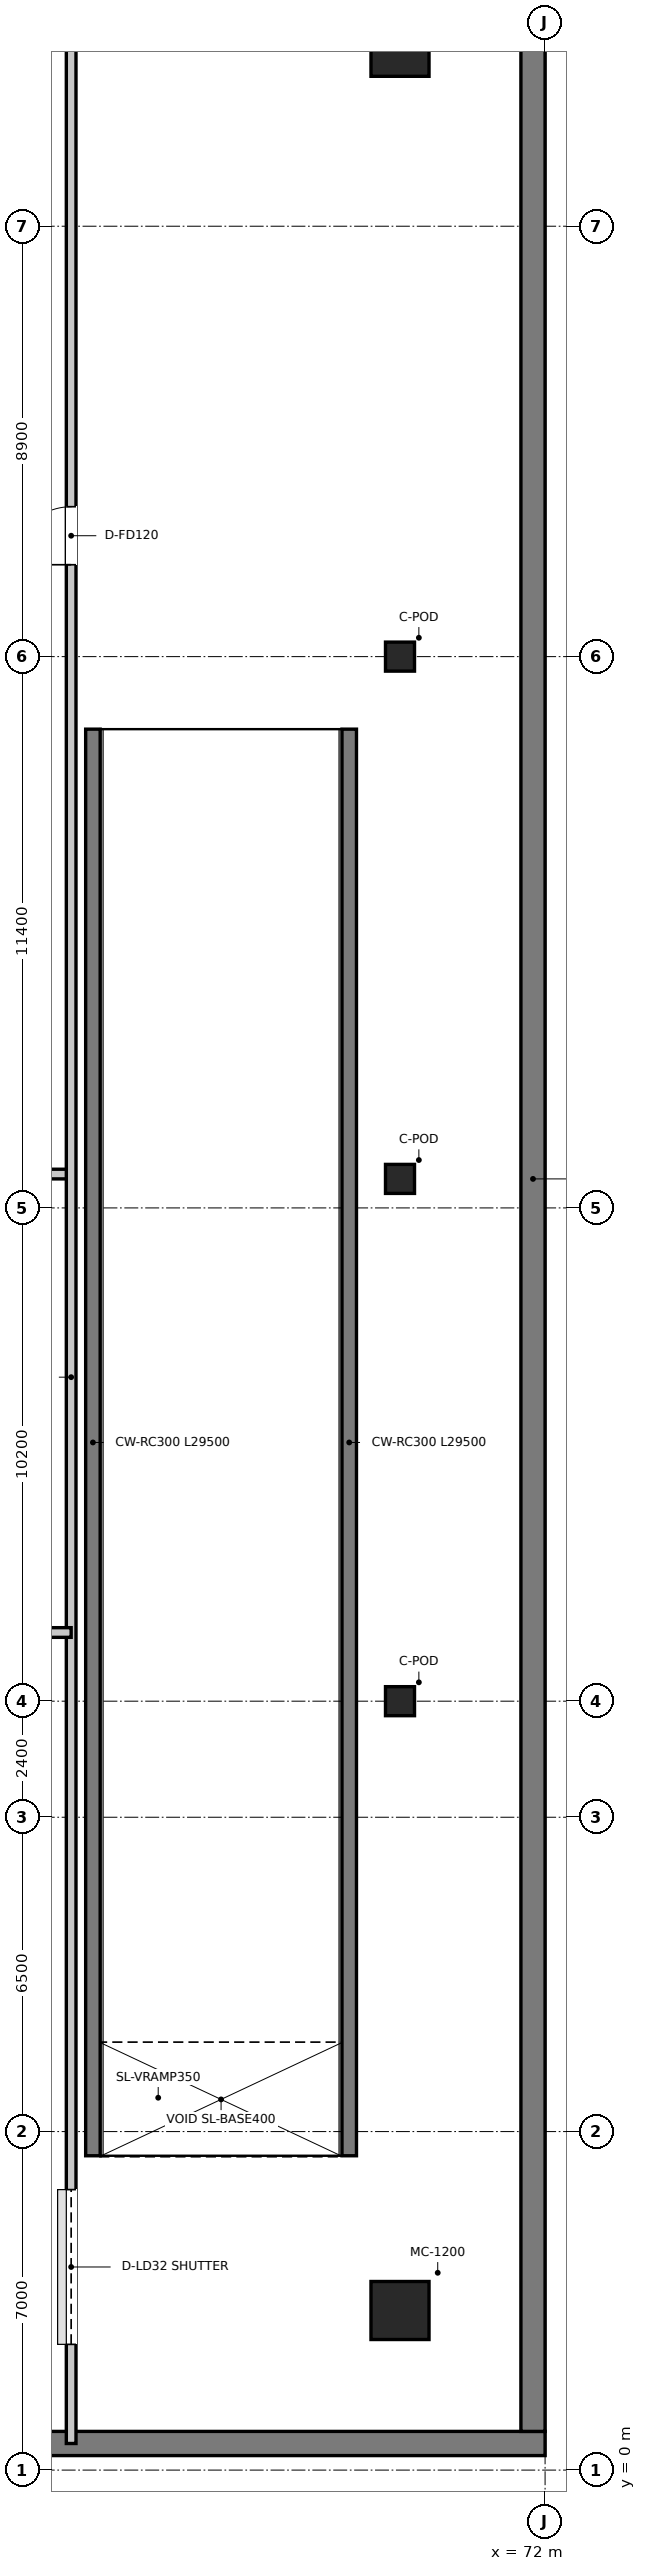
"""IFC4 building model, lengths in metres.
Left out: names, types, materials, properties, quantities, classifications, styles, units other than length and angle.
Written with IfcOpenShell. Run it as: python <this file> out.ifc"""

import sys

from ifc_helpers import new_model, si_unit, direction, frame, frame_2d, origin, origin_2d, place, context, subcontext, project, spatial, rectangle, extrude, source, transform, mapped, element, fill, save


model = new_model("IFC4")
c1 = context("Model", 3, precision=1e-05, world=origin(), true_north=direction((0.0, 1.0)))
c2 = subcontext(c1, "Body", "Model", "MODEL_VIEW")
j1 = project(units=[si_unit("LENGTHUNIT", "METRE"), si_unit("PLANEANGLEUNIT", "RADIAN")], contexts=[c1])
p1 = place(None, origin())
s1 = spatial("IfcSite", under=j1, at=p1, CompositionType="ELEMENT")
p2 = place(p1, origin())
s2 = spatial("IfcBuilding", under=s1, at=p2, CompositionType="ELEMENT")
p3 = place(p2, frame((0.0, 0.0, -4.8)))
s3 = spatial("IfcBuildingStorey", under=s2, at=p3, CompositionType="ELEMENT", Elevation=-4.8)
p4 = place(p3, frame((0.0, 0.55, 0.0), z_axis=(0.0, 0.0, 1.0), x_axis=(1.0, 0.0, 0.0)))
e1 = element("IfcWall", 1, at=p4, inside=s3, PredefinedType="SOLIDWALL", context=c2, shape_type="SweptSolid", body=[
    extrude(rectangle(XDim=72.0, YDim=0.5, at=frame_2d((36.0, 0.0))), origin(), (0.0, 0.0, 1.0), 4.8),
])
p5 = place(p3, frame((71.75, 0.8, 0.0), z_axis=(0.0, 0.0, 1.0), x_axis=(0.0, 1.0, 0.0)))
e2 = element("IfcWall", 2, at=p5, inside=s3, PredefinedType="SOLIDWALL", context=c2, shape_type="SweptSolid", body=[
    extrude(rectangle(XDim=51.8, YDim=0.5, at=frame_2d((25.9, 0.0))), origin(), (0.0, 0.0, 1.0), 4.8),
])
for number, where, z_axis, x_axis in (
    (3, (62.65, 6.5, 0.0), (0.0, 0.0, 1.0), (0.0, 1.0, 0.0)),
    (4, (67.95, 6.5, 0.0), (0.0, 0.0, 1.0), (0.0, 1.0, 0.0)),
):
    element("IfcWall", number, at=place(p3, frame(where, z_axis=z_axis, x_axis=x_axis)), inside=s3, PredefinedType="SHEAR", context=c2, shape_type="SweptSolid", body=[
        extrude(rectangle(XDim=29.5, YDim=0.3, at=frame_2d((14.75, 0.0))), origin(), (0.0, 0.0, 1.0), 4.45),
    ])
m1 = source(origin(), c2, "Body", "SweptSolid", [
    extrude(rectangle(XDim=1.2, YDim=1.2, at=origin_2d()), origin(), (0.0, 0.0, 1.0), 4.8),
])
for number, where, z_axis, x_axis in (
    (5, (69.0, 3.3, 0.0), (0.0, 0.0, 1.0), (1.0, 0.0, 0.0)),
    (6, (69.0, 50.1, 0.0), (0.0, 0.0, 1.0), (1.0, 0.0, 0.0)),
):
    element("IfcColumn", number, at=place(p3, frame(where, z_axis=z_axis, x_axis=x_axis)), inside=s3, PredefinedType="USERDEFINED", context=c2, shape_type="MappedRepresentation", body=[
        mapped(m1, transform((0.0, 0.0, 0.0), x_axis=(1.0, 0.0, 0.0), y_axis=(0.0, 1.0, 0.0), z_axis=(0.0, 0.0, 1.0), scale=1.0)),
    ])
m2 = source(origin(), c2, "Body", "SweptSolid", [
    extrude(rectangle(XDim=0.6, YDim=0.6, at=origin_2d()), origin(), (0.0, 0.0, 1.0), 4.8),
])
for number, where, z_axis, x_axis in (
    (7, (69.0, 15.9, 0.0), (0.0, 0.0, 1.0), (1.0, 0.0, 0.0)),
    (8, (69.0, 26.7, 0.0), (0.0, 0.0, 1.0), (1.0, 0.0, 0.0)),
    (9, (69.0, 37.5, 0.0), (0.0, 0.0, 1.0), (1.0, 0.0, 0.0)),
):
    element("IfcColumn", number, at=place(p3, frame(where, z_axis=z_axis, x_axis=x_axis)), inside=s3, PredefinedType="COLUMN", context=c2, shape_type="MappedRepresentation", body=[
        mapped(m2, transform((0.0, 0.0, 0.0), x_axis=(1.0, 0.0, 0.0), y_axis=(0.0, 1.0, 0.0), z_axis=(0.0, 0.0, 1.0), scale=1.0)),
    ])
p6 = place(p3, frame((44.1, 26.8, 0.0), z_axis=(0.0, 0.0, 1.0), x_axis=(1.0, 0.0, 0.0)))
e10 = element("IfcWall", 10, at=p6, inside=s3, PredefinedType="PARTITIONING", context=c2, shape_type="SweptSolid", body=[
    extrude(rectangle(XDim=18.1, YDim=0.2, at=frame_2d((9.05, 0.0))), origin(), (0.0, 0.0, 1.0), 3.65),
])
p7 = place(p6, frame((4.3, 0.0, 0.0)))
e11 = element("IfcOpeningElement", 11, at=p7, cuts=e10, PredefinedType="OPENING", context=c2, shape_type="SweptSolid", body=[
    extrude(rectangle(XDim=1.2, YDim=2.15, at=frame_2d((0.6, 1.075))), frame((0.0, 0.11, 0.0), z_axis=(0.0, -1.0, 0.0), x_axis=(1.0, 0.0, 0.0)), (0.0, 0.0, 1.0), 0.22),
])
p8 = place(p6, frame((13.55, 0.0, 0.0)))
e12 = element("IfcOpeningElement", 12, at=p8, cuts=e10, PredefinedType="OPENING", context=c2, shape_type="SweptSolid", body=[
    extrude(rectangle(XDim=1.1, YDim=2.15, at=frame_2d((0.55, 1.075))), frame((0.0, 0.11, 0.0), z_axis=(0.0, -1.0, 0.0), x_axis=(1.0, 0.0, 0.0)), (0.0, 0.0, 1.0), 0.22),
])
p9 = place(p3, frame((62.2, 0.55, 0.0), z_axis=(0.0, 0.0, 1.0), x_axis=(0.0, 1.0, 0.0)))
e13 = element("IfcWall", 13, at=p9, inside=s3, PredefinedType="PARTITIONING", context=c2, shape_type="SweptSolid", body=[
    extrude(rectangle(XDim=51.95, YDim=0.2, at=frame_2d((25.975, 0.0))), origin(), (0.0, 0.0, 1.0), 3.81),
])
p10 = place(p9, frame((2.05, 0.0, 0.0)))
e14 = element("IfcOpeningElement", 14, at=p10, cuts=e13, PredefinedType="OPENING", context=c2, shape_type="SweptSolid", body=[
    extrude(rectangle(XDim=3.2, YDim=3.6, at=frame_2d((1.6, 1.8))), frame((0.0, 0.11, 0.0), z_axis=(0.0, -1.0, 0.0), x_axis=(1.0, 0.0, 0.0)), (0.0, 0.0, 1.0), 0.22),
])
p11 = place(p9, frame((38.85, 0.0, 0.0)))
e15 = element("IfcOpeningElement", 15, at=p11, cuts=e13, PredefinedType="OPENING", context=c2, shape_type="SweptSolid", body=[
    extrude(rectangle(XDim=1.2, YDim=2.15, at=frame_2d((0.6, 1.075))), frame((0.0, 0.11, 0.0), z_axis=(0.0, -1.0, 0.0), x_axis=(1.0, 0.0, 0.0)), (0.0, 0.0, 1.0), 0.22),
])
p12 = place(p3, frame((47.25, 17.32, 0.0), z_axis=(0.0, 0.0, 1.0), x_axis=(1.0, 0.0, 0.0)))
e16 = element("IfcWall", 16, at=p12, inside=s3, PredefinedType="PARTITIONING", context=c2, shape_type="SweptSolid", body=[
    extrude(rectangle(XDim=14.95, YDim=0.2, at=frame_2d((7.475, 0.0))), origin(), (0.0, 0.0, 1.0), 3.76),
])
p13 = place(p10, origin())
e17 = element("IfcDoor", 17, at=p13, inside=s3, OperationType="ROLLINGUP", PredefinedType="GATE", context=c2, shape_type="SweptSolid", body=[
    extrude(rectangle(XDim=3.2, YDim=3.6, at=frame_2d((1.6, 1.8))), frame((0.0, 0.025, 0.0), z_axis=(0.0, -1.0, 0.0), x_axis=(1.0, 0.0, 0.0)), (0.0, 0.0, 1.0), 0.05),
])
fill(e14, e17)
p14 = place(p11, origin())
e18 = element("IfcDoor", 18, at=p14, inside=s3, OperationType="SINGLE_SWING_LEFT", PredefinedType="DOOR", context=c2, shape_type="SweptSolid", body=[
    extrude(rectangle(XDim=1.2, YDim=2.15, at=frame_2d((0.6, 1.075))), frame((0.0, 0.025, 0.0), z_axis=(0.0, -1.0, 0.0), x_axis=(1.0, 0.0, 0.0)), (0.0, 0.0, 1.0), 0.05),
])
fill(e15, e18)
save(model, sys.argv[1])
